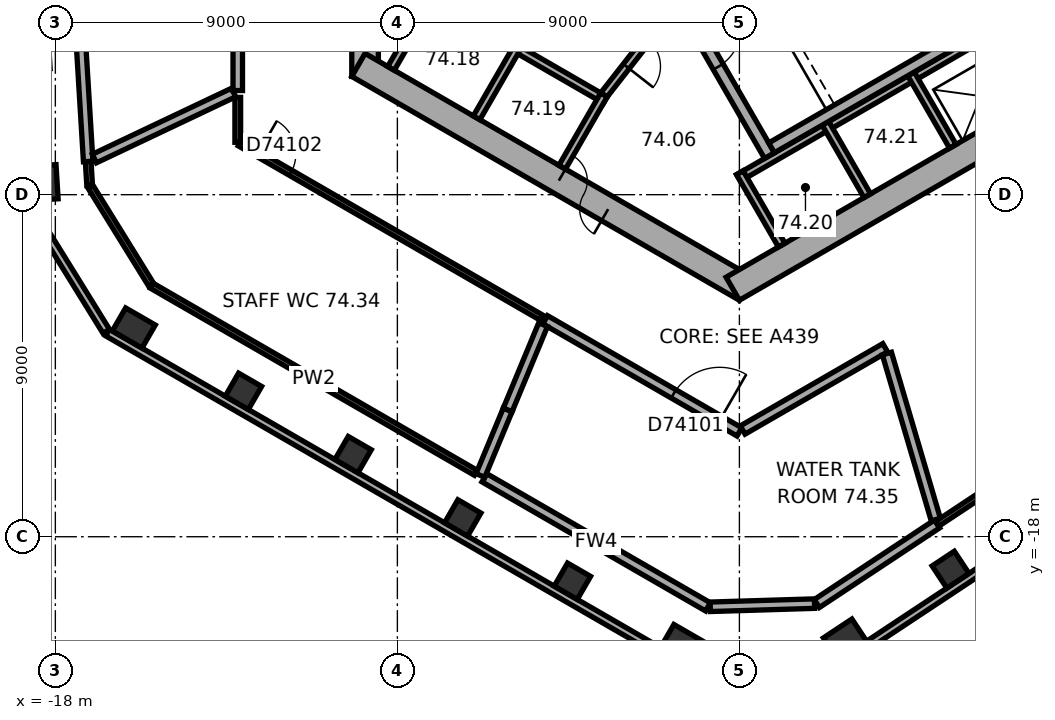
"""IFC4 building model, lengths in metres.
Left out: names, types, materials, properties, quantities, classifications, styles, units other than length and angle.
Written with IfcOpenShell. Run it as: python <this file> out.ifc"""

import sys

from ifc_helpers import new_model, si_unit, direction, frame, frame_2d, origin, origin_2d, place, context, subcontext, project, spatial, rectangle, extrude, element, fill, save


model = new_model("IFC4")
c1 = context("Model", 3, precision=1e-05, world=origin(), true_north=direction((0.0, 1.0)))
c2 = subcontext(c1, "Body", "Model", "MODEL_VIEW")
j1 = project(units=[si_unit("LENGTHUNIT", "METRE"), si_unit("PLANEANGLEUNIT", "RADIAN")], contexts=[c1])
p1 = place(None, origin())
s1 = spatial("IfcSite", under=j1, at=p1, CompositionType="ELEMENT")
p2 = place(p1, origin())
s2 = spatial("IfcBuilding", under=s1, at=p2, CompositionType="ELEMENT")
p3 = place(p2, frame((0.0, 0.0, 300.5)))
s3 = spatial("IfcBuildingStorey", under=s2, at=p3, CompositionType="ELEMENT", Elevation=300.5)
for number, where, z_axis, x_axis in (
    (1, (-18.304, -8.68, 0.0), (0.0, 0.0, 1.0), (0.061, -0.998, 0.0)),
    (2, (-15.936, -12.508, 0.0), (0.0, 0.0, 1.0), (0.866, -0.5, 0.0)),
):
    element("IfcColumn", number, at=place(p3, frame(where, z_axis=z_axis, x_axis=x_axis)), inside=s3, PredefinedType="COLUMN", context=c2, shape_type="SweptSolid", body=[
        extrude(rectangle(XDim=0.9, YDim=0.7, at=origin_2d()), origin(), (0.0, 0.0, 1.0), 4.5),
    ])
for number, where, z_axis, x_axis in (
    (3, (-13.05, -14.174, 0.0), (0.0, 0.0, 1.0), (0.866, -0.5, 0.0)),
    (4, (-10.165, -15.84, 0.0), (0.0, 0.0, 1.0), (0.866, -0.5, 0.0)),
    (5, (-7.28, -17.505, 0.0), (0.0, 0.0, 1.0), (0.866, -0.5, 0.0)),
    (6, (-4.395, -19.171, 0.0), (0.0, 0.0, 1.0), (0.866, -0.5, 0.0)),
):
    element("IfcColumn", number, at=place(p3, frame(where, z_axis=z_axis, x_axis=x_axis)), inside=s3, PredefinedType="COLUMN", context=c2, shape_type="SweptSolid", body=[
        extrude(rectangle(XDim=0.7, YDim=0.7, at=origin_2d()), origin(), (0.0, 0.0, 1.0), 4.5),
    ])
for number, where, z_axis, x_axis in (
    (7, (-1.509, -20.837, 0.0), (0.0, 0.0, 1.0), (0.866, -0.5, 0.0)),
    (8, (2.778, -20.706, 0.0), (0.0, 0.0, 1.0), (0.834, 0.552, 0.0)),
):
    element("IfcColumn", number, at=place(p3, frame(where, z_axis=z_axis, x_axis=x_axis)), inside=s3, PredefinedType="COLUMN", context=c2, shape_type="SweptSolid", body=[
        extrude(rectangle(XDim=0.9, YDim=0.7, at=origin_2d()), origin(), (0.0, 0.0, 1.0), 4.5),
    ])
p4 = place(p3, frame((5.557, -18.867, 0.0), z_axis=(0.0, 0.0, 1.0), x_axis=(0.833885822067, 0.551936985312, 0.0)))
e9 = element("IfcColumn", 9, at=p4, inside=s3, PredefinedType="COLUMN", context=c2, shape_type="SweptSolid", body=[
    extrude(rectangle(XDim=0.7, YDim=0.7, at=origin_2d()), origin(), (0.0, 0.0, 1.0), 4.5),
])
p5 = place(p3, frame((-9.85, 5.889, 0.0), z_axis=(0.0, 0.0, 1.0), x_axis=(0.0, -1.0, 0.0)))
e10 = element("IfcWall", 10, at=p5, inside=s3, PredefinedType="SHEAR", context=c2, shape_type="SweptSolid", body=[
    extrude(rectangle(XDim=11.778, YDim=0.7, at=frame_2d((5.889, 0.0))), origin(), (0.0, 0.0, 1.0), 4.5),
])
p6 = place(p3, frame((-10.025, -5.586, 0.0), z_axis=(0.0, 0.0, 1.0), x_axis=(0.866026453023, -0.499998182661, 0.0)))
e11 = element("IfcWall", 11, at=p6, inside=s3, PredefinedType="SHEAR", context=c2, shape_type="SweptSolid", body=[
    extrude(rectangle(XDim=11.778, YDim=0.7, at=frame_2d((5.889, 0.0))), origin(), (0.0, 0.0, 1.0), 4.5),
])
p7 = place(p6, frame((6.089, 0.0, 0.0)))
e12 = element("IfcOpeningElement", 12, at=p7, cuts=e11, PredefinedType="OPENING", context=c2, shape_type="SweptSolid", body=[
    extrude(rectangle(XDim=1.5, YDim=2.1, at=frame_2d((0.75, 1.05))), frame((0.0, 0.36, 0.0), z_axis=(0.0, -1.0, 0.0), x_axis=(1.0, 0.0, 0.0)), (0.0, 0.0, 1.0), 0.72),
])
p8 = place(p3, frame((-0.175, -11.475, 0.0), z_axis=(0.0, 0.0, 1.0), x_axis=(0.866026453023, 0.499998182661, 0.0)))
e13 = element("IfcWall", 13, at=p8, inside=s3, PredefinedType="SHEAR", context=c2, shape_type="SweptSolid", body=[
    extrude(rectangle(XDim=11.778, YDim=0.7, at=frame_2d((5.889, 0.0))), origin(), (0.0, 0.0, 1.0), 4.5),
])
p9 = place(p8, frame((7.639, 0.0, 0.0)))
e14 = element("IfcOpeningElement", 14, at=p9, cuts=e13, PredefinedType="OPENING", context=c2, shape_type="SweptSolid", body=[
    extrude(rectangle(XDim=1.1, YDim=2.1, at=frame_2d((0.55, 1.05))), frame((0.0, 0.36, 0.0), z_axis=(0.0, -1.0, 0.0), x_axis=(1.0, 0.0, 0.0)), (0.0, 0.0, 1.0), 0.72),
])
p10 = place(p3, frame((-18.706, -9.291, 0.0), z_axis=(0.0, 0.0, 1.0), x_axis=(0.526209683648, -0.850354848775, 0.0)))
e15 = element("IfcWall", 15, at=p10, inside=s3, PredefinedType="STANDARD", context=c2, shape_type="SweptSolid", body=[
    extrude(rectangle(XDim=3.886, YDim=0.2, at=frame_2d((1.943, 0.0))), origin(), (0.0, 0.0, 1.0), 4.5),
])
for number, where, z_axis, x_axis in (
    (16, (-16.626, -12.629, 0.0), (0.0, 0.0, 1.0), (0.866, -0.5, 0.0)),
    (17, (2.58, -21.377, 0.0), (0.0, 0.0, 1.0), (0.834, 0.552, 0.0)),
):
    element("IfcWall", number, at=place(p3, frame(where, z_axis=z_axis, x_axis=x_axis)), inside=s3, PredefinedType="STANDARD", context=c2, shape_type="SweptSolid", body=[
        extrude(rectangle(XDim=17.731, YDim=0.2, at=frame_2d((8.866, 0.0))), origin(), (0.0, 0.0, 1.0), 4.5),
    ])
p11 = place(p3, frame((-8.203, -3.809, 0.0), z_axis=(0.0, 0.0, 1.0), x_axis=(0.866028230842, -0.499995103361, 0.0)))
e18 = element("IfcWall", 18, at=p11, inside=s3, PredefinedType="PARTITIONING", context=c2, shape_type="SweptSolid", body=[
    extrude(rectangle(XDim=5.4, YDim=0.2, at=frame_2d((2.7, 0.0))), origin(), (0.0, 0.0, 1.0), 4.2),
])
for number, where, z_axis, x_axis in (
    (19, (-8.067, -3.772, 0.0), (0.0, 0.0, 1.0), (-0.5, -0.866, 0.0)),
    (20, (-5.815, -5.072, 0.0), (0.0, 0.0, 1.0), (-0.5, -0.866, 0.0)),
):
    element("IfcWall", number, at=place(p3, frame(where, z_axis=z_axis, x_axis=x_axis)), inside=s3, PredefinedType="PARTITIONING", context=c2, shape_type="SweptSolid", body=[
        extrude(rectangle(XDim=2.2, YDim=0.2, at=frame_2d((1.1, 0.0))), origin(), (0.0, 0.0, 1.0), 4.2),
    ])
p12 = place(p3, frame((-3.563, -6.372, 0.0), z_axis=(0.0, 0.0, 1.0), x_axis=(-0.499994660107, -0.866028486751, 0.0)))
e21 = element("IfcWall", 21, at=p12, inside=s3, PredefinedType="PARTITIONING", context=c2, shape_type="SweptSolid", body=[
    extrude(rectangle(XDim=2.2, YDim=0.2, at=frame_2d((1.1, 0.0))), origin(), (0.0, 0.0, 1.0), 4.2),
])
p13 = place(p3, frame((-0.024, -8.559, 0.0), z_axis=(0.0, 0.0, 1.0), x_axis=(0.866026010844, 0.49999894854, 0.0)))
e22 = element("IfcWall", 22, at=p13, inside=s3, PredefinedType="PARTITIONING", context=c2, shape_type="SweptSolid", body=[
    extrude(rectangle(XDim=8.0, YDim=0.2, at=frame_2d((4.0, 0.0))), origin(), (0.0, 0.0, 1.0), 4.2),
])
for number, where, z_axis, x_axis in (
    (23, (0.013, -8.422, 0.0), (0.0, 0.0, 1.0), (0.5, -0.866, 0.0)),
    (24, (2.264, -7.122, 0.0), (0.0, 0.0, 1.0), (0.5, -0.866, 0.0)),
    (25, (4.516, -5.822, 0.0), (0.0, 0.0, 1.0), (0.5, -0.866, 0.0)),
):
    element("IfcWall", number, at=place(p3, frame(where, z_axis=z_axis, x_axis=x_axis)), inside=s3, PredefinedType="PARTITIONING", context=c2, shape_type="SweptSolid", body=[
        extrude(rectangle(XDim=2.2, YDim=0.2, at=frame_2d((1.1, 0.0))), origin(), (0.0, 0.0, 1.0), 4.2),
    ])
p14 = place(p3, frame((-1.558, -3.902, 0.0), z_axis=(0.0, 0.0, 1.0), x_axis=(0.499977259774, -0.866038532462, 0.0)))
e26 = element("IfcWall", 26, at=p14, inside=s3, PredefinedType="SHEAR", context=c2, shape_type="SweptSolid", body=[
    extrude(rectangle(XDim=4.7, YDim=0.3, at=frame_2d((2.35, 0.0))), origin(), (0.0, 0.0, 1.0), 4.5),
])
p15 = place(p14, frame((0.8, 0.0, 0.0)))
e27 = element("IfcOpeningElement", 27, at=p15, cuts=e26, PredefinedType="OPENING", context=c2, shape_type="SweptSolid", body=[
    extrude(rectangle(XDim=1.2, YDim=2.1, at=frame_2d((0.6, 1.05))), frame((0.0, 0.16, 0.0), z_axis=(0.0, -1.0, 0.0), x_axis=(1.0, 0.0, 0.0)), (0.0, 0.0, 1.0), 0.32),
])
p16 = place(p3, frame((0.847, -7.767, 0.0), z_axis=(0.0, 0.0, 1.0), x_axis=(0.866027801685, 0.499995846692, 0.0)))
e28 = element("IfcWall", 28, at=p16, inside=s3, PredefinedType="SHEAR", context=c2, shape_type="SweptSolid", body=[
    extrude(rectangle(XDim=7.06, YDim=0.3, at=frame_2d((3.53, 0.0))), origin(), (0.0, 0.0, 1.0), 4.5),
])
p17 = place(p3, frame((-1.712, -4.008, 0.0), z_axis=(0.0, 0.0, 1.0), x_axis=(-0.616549420702, -0.787316208287, 0.0)))
e29 = element("IfcWall", 29, at=p17, inside=s3, PredefinedType="PARTITIONING", context=c2, shape_type="SweptSolid", body=[
    extrude(rectangle(XDim=3.002, YDim=0.2, at=frame_2d((1.501, 0.0))), origin(), (0.0, 0.0, 1.0), 4.2),
])
p18 = place(p17, frame((1.15, 0.0, 0.0)))
e30 = element("IfcOpeningElement", 30, at=p18, cuts=e29, PredefinedType="OPENING", context=c2, shape_type="SweptSolid", body=[
    extrude(rectangle(XDim=0.9, YDim=2.1, at=frame_2d((0.45, 1.05))), frame((0.0, 0.11, 0.0), z_axis=(0.0, -1.0, 0.0), x_axis=(1.0, 0.0, 0.0)), (0.0, 0.0, 1.0), 0.22),
])
p19 = place(p3, frame((-0.827, -19.845, 0.0), z_axis=(0.0, 0.0, 1.0), x_axis=(-0.866014453193, 0.500018966502, 0.0)))
e31 = element("IfcWall", 31, at=p19, inside=s3, PredefinedType="SOLIDWALL", context=c2, shape_type="SweptSolid", body=[
    extrude(rectangle(XDim=6.795, YDim=0.25, at=frame_2d((3.397, 0.0))), origin(), (0.0, 0.0, 1.0), 4.2),
])
p20 = place(p3, frame((1.977, -19.76, 0.0), z_axis=(0.0, 0.0, 1.0), x_axis=(-0.999531996278, -0.030590658961, 0.0)))
e32 = element("IfcWall", 32, at=p20, inside=s3, PredefinedType="SOLIDWALL", context=c2, shape_type="SweptSolid", body=[
    extrude(rectangle(XDim=2.745, YDim=0.25, at=frame_2d((1.373, 0.0))), origin(), (0.0, 0.0, 1.0), 4.2),
])
p21 = place(p3, frame((5.202, -17.663, 0.0), z_axis=(0.0, 0.0, 1.0), x_axis=(-0.833856881781, -0.551980706824, 0.0)))
e33 = element("IfcWall", 33, at=p21, inside=s3, PredefinedType="SOLIDWALL", context=c2, shape_type="SweptSolid", body=[
    extrude(rectangle(XDim=3.795, YDim=0.25, at=frame_2d((1.898, 0.0))), origin(), (0.0, 0.0, 1.0), 4.2),
])
p22 = place(p3, frame((-6.936, -16.318, 0.0), z_axis=(0.0, 0.0, 1.0), x_axis=(-0.866026615439, 0.499997901347, 0.0)))
e34 = element("IfcWall", 34, at=p22, inside=s3, PredefinedType="PARTITIONING", context=c2, shape_type="SweptSolid", body=[
    extrude(rectangle(XDim=9.846, YDim=0.15, at=frame_2d((4.923, 0.0))), origin(), (0.0, 0.0, 1.0), 4.2),
])
p23 = place(p3, frame((0.0, -15.242, 0.0), z_axis=(0.0, 0.0, 1.0), x_axis=(-0.866043002582, 0.49996951675, 0.0)))
e35 = element("IfcWall", 35, at=p23, inside=s3, PredefinedType="SOLIDWALL", context=c2, shape_type="SweptSolid", body=[
    extrude(rectangle(XDim=5.902, YDim=0.25, at=frame_2d((2.951, 0.0))), origin(), (0.0, 0.0, 1.0), 4.2),
])
p24 = place(p23, frame((0.6, 0.0, 0.0)))
e36 = element("IfcOpeningElement", 36, at=p24, cuts=e35, PredefinedType="OPENING", context=c2, shape_type="SweptSolid", body=[
    extrude(rectangle(XDim=1.4, YDim=2.1, at=frame_2d((0.7, 1.05))), frame((0.0, 0.135, 0.0), z_axis=(0.0, -1.0, 0.0), x_axis=(1.0, 0.0, 0.0)), (0.0, 0.0, 1.0), 0.27),
])
p25 = place(p3, frame((0.087, -15.192, 0.0), z_axis=(0.0, 0.0, 1.0), x_axis=(0.866038167814, 0.4999778914, 0.0)))
e37 = element("IfcWall", 37, at=p25, inside=s3, PredefinedType="SOLIDWALL", context=c2, shape_type="SweptSolid", body=[
    extrude(rectangle(XDim=4.33, YDim=0.25, at=frame_2d((2.165, 0.0))), origin(), (0.0, 0.0, 1.0), 4.2),
])
p26 = place(p3, frame((-6.097, -14.662, 0.0), z_axis=(0.0, 0.0, 1.0), x_axis=(-0.384031181584, -0.923320124102, 0.0)))
e38 = element("IfcWall", 38, at=p26, inside=s3, PredefinedType="SOLIDWALL", context=c2, shape_type="SweptSolid", body=[
    extrude(rectangle(XDim=1.87, YDim=0.25, at=frame_2d((0.935, 0.0))), origin(), (0.0, 0.0, 1.0), 4.2),
])
p27 = place(p3, frame((-6.097, -14.662, 0.0), z_axis=(0.0, 0.0, 1.0), x_axis=(0.38380822766, 0.923412824462, 0.0)))
e39 = element("IfcWall", 39, at=p27, inside=s3, PredefinedType="SOLIDWALL", context=c2, shape_type="SweptSolid", body=[
    extrude(rectangle(XDim=2.427, YDim=0.25, at=frame_2d((1.214, 0.0))), origin(), (0.0, 0.0, 1.0), 4.2),
])
p28 = place(p3, frame((3.882, -13.18, 0.0), z_axis=(0.0, 0.0, 1.0), x_axis=(0.282587245572, -0.959241600766, 0.0)))
e40 = element("IfcWall", 40, at=p28, inside=s3, PredefinedType="SOLIDWALL", context=c2, shape_type="SweptSolid", body=[
    extrude(rectangle(XDim=4.553, YDim=0.25, at=frame_2d((2.276, 0.0))), origin(), (0.0, 0.0, 1.0), 4.2),
])
p29 = place(p3, frame((-15.485, -11.361, 0.0), z_axis=(0.0, 0.0, 1.0), x_axis=(-0.526112913706, 0.850414723551, 0.0)))
e41 = element("IfcWall", 41, at=p29, inside=s3, PredefinedType="PARTITIONING", context=c2, shape_type="SweptSolid", body=[
    extrude(rectangle(XDim=3.026, YDim=0.15, at=frame_2d((1.513, 0.0))), origin(), (0.0, 0.0, 1.0), 4.2),
])
p30 = place(p3, frame((16.13, -10.429, 0.0), z_axis=(0.0, 0.0, 1.0), x_axis=(-0.833865754552, -0.551967302822, 0.0)))
e42 = element("IfcWall", 42, at=p30, inside=s3, PredefinedType="PARTITIONING", context=c2, shape_type="SweptSolid", body=[
    extrude(rectangle(XDim=13.105, YDim=0.15, at=frame_2d((6.553, 0.0))), origin(), (0.0, 0.0, 1.0), 4.2),
])
p31 = place(p3, frame((-17.097, -8.754, 0.0), z_axis=(0.0, 0.0, 1.0), x_axis=(-0.061362744718, 0.998115531169, 0.0)))
e43 = element("IfcWall", 43, at=p31, inside=s3, PredefinedType="PARTITIONING", context=c2, shape_type="SweptSolid", body=[
    extrude(rectangle(XDim=0.629, YDim=0.15, at=frame_2d((0.314, 0.0))), origin(), (0.0, 0.0, 1.0), 4.2),
])
p32 = place(p3, frame((-17.136, -8.126, 0.0), z_axis=(0.0, 0.0, 1.0), x_axis=(-0.061029278948, 0.998135976263, 0.0)))
e44 = element("IfcWall", 44, at=p32, inside=s3, PredefinedType="SOLIDWALL", context=c2, shape_type="SweptSolid", body=[
    extrude(rectangle(XDim=9.217, YDim=0.25, at=frame_2d((4.608, 0.0))), origin(), (0.0, 0.0, 1.0), 4.2),
])
p33 = place(p3, frame((-13.148, -7.651, 0.0), z_axis=(0.0, 0.0, 1.0), x_axis=(0.866016920268, -0.500014693593, 0.0)))
e45 = element("IfcWall", 45, at=p33, inside=s3, PredefinedType="PARTITIONING", context=c2, shape_type="SweptSolid", body=[
    extrude(rectangle(XDim=9.16, YDim=0.15, at=frame_2d((4.58, 0.0))), origin(), (0.0, 0.0, 1.0), 4.2),
])
p34 = place(p33, frame((0.55, 0.0, 0.0)))
e46 = element("IfcOpeningElement", 46, at=p34, cuts=e45, PredefinedType="OPENING", context=c2, shape_type="SweptSolid", body=[
    extrude(rectangle(XDim=1.0, YDim=2.1, at=frame_2d((0.5, 1.05))), frame((0.0, 0.085, 0.0), z_axis=(0.0, -1.0, 0.0), x_axis=(1.0, 0.0, 0.0)), (0.0, 0.0, 1.0), 0.17),
])
p35 = place(p3, frame((-13.2, -7.621, 0.0), z_axis=(0.0, 0.0, 1.0), x_axis=(0.0, 1.0, 0.0)))
e47 = element("IfcWall", 47, at=p35, inside=s3, PredefinedType="PARTITIONING", context=c2, shape_type="SweptSolid", body=[
    extrude(rectangle(XDim=1.181, YDim=0.15, at=frame_2d((0.591, 0.0))), origin(), (0.0, 0.0, 1.0), 4.2),
])
p36 = place(p3, frame((-13.308, -6.312, 0.0), z_axis=(0.0, 0.0, 1.0), x_axis=(-0.903573543336, -0.428433019016, 0.0)))
e48 = element("IfcWall", 48, at=p36, inside=s3, PredefinedType="SOLIDWALL", context=c2, shape_type="SweptSolid", body=[
    extrude(rectangle(XDim=4.056, YDim=0.25, at=frame_2d((2.028, 0.0))), origin(), (0.0, 0.0, 1.0), 4.2),
])
p37 = place(p3, frame((-13.2, -6.26, 0.0), z_axis=(0.0, 0.0, 1.0), x_axis=(0.0, 1.0, 0.0)))
e49 = element("IfcWall", 49, at=p37, inside=s3, PredefinedType="SOLIDWALL", context=c2, shape_type="SweptSolid", body=[
    extrude(rectangle(XDim=7.165, YDim=0.25, at=frame_2d((3.582, 0.0))), origin(), (0.0, 0.0, 1.0), 4.2),
])
p38 = place(p37, frame((5.115, 0.0, 0.0)))
e50 = element("IfcOpeningElement", 50, at=p38, cuts=e49, PredefinedType="OPENING", context=c2, shape_type="SweptSolid", body=[
    extrude(rectangle(XDim=1.4, YDim=2.1, at=frame_2d((0.7, 1.05))), frame((0.0, 0.135, 0.0), z_axis=(0.0, -1.0, 0.0), x_axis=(1.0, 0.0, 0.0)), (0.0, 0.0, 1.0), 0.27),
])
p39 = place(p7, origin())
e51 = element("IfcDoor", 51, at=p39, inside=s3, OperationType="DOUBLE_DOOR_SINGLE_SWING", PredefinedType="DOOR", context=c2, shape_type="SweptSolid", body=[
    extrude(rectangle(XDim=1.5, YDim=2.1, at=frame_2d((0.75, 1.05))), frame((0.0, 0.025, 0.0), z_axis=(0.0, -1.0, 0.0), x_axis=(1.0, 0.0, 0.0)), (0.0, 0.0, 1.0), 0.05),
])
fill(e12, e51)
p40 = place(p15, origin())
e52 = element("IfcDoor", 52, at=p40, inside=s3, OperationType="SINGLE_SWING_RIGHT", PredefinedType="DOOR", context=c2, shape_type="SweptSolid", body=[
    extrude(rectangle(XDim=1.2, YDim=2.1, at=frame_2d((0.6, 1.05))), frame((0.0, 0.025, 0.0), z_axis=(0.0, -1.0, 0.0), x_axis=(1.0, 0.0, 0.0)), (0.0, 0.0, 1.0), 0.05),
])
fill(e27, e52)
p41 = place(p18, origin())
e53 = element("IfcDoor", 53, at=p41, inside=s3, OperationType="SINGLE_SWING_LEFT", PredefinedType="DOOR", context=c2, shape_type="SweptSolid", body=[
    extrude(rectangle(XDim=0.9, YDim=2.1, at=frame_2d((0.45, 1.05))), frame((0.0, 0.025, 0.0), z_axis=(0.0, -1.0, 0.0), x_axis=(1.0, 0.0, 0.0)), (0.0, 0.0, 1.0), 0.05),
])
fill(e30, e53)
p42 = place(p24, origin())
e54 = element("IfcDoor", 54, at=p42, inside=s3, OperationType="SINGLE_SWING_LEFT", PredefinedType="DOOR", context=c2, shape_type="SweptSolid", body=[
    extrude(rectangle(XDim=1.4, YDim=2.1, at=frame_2d((0.7, 1.05))), frame((0.0, 0.025, 0.0), z_axis=(0.0, -1.0, 0.0), x_axis=(1.0, 0.0, 0.0)), (0.0, 0.0, 1.0), 0.05),
])
fill(e36, e54)
p43 = place(p34, origin())
e55 = element("IfcDoor", 55, at=p43, inside=s3, OperationType="SINGLE_SWING_LEFT", PredefinedType="DOOR", context=c2, shape_type="SweptSolid", body=[
    extrude(rectangle(XDim=1.0, YDim=2.1, at=frame_2d((0.5, 1.05))), frame((0.0, 0.025, 0.0), z_axis=(0.0, -1.0, 0.0), x_axis=(1.0, 0.0, 0.0)), (0.0, 0.0, 1.0), 0.05),
])
fill(e46, e55)
save(model, sys.argv[1])
